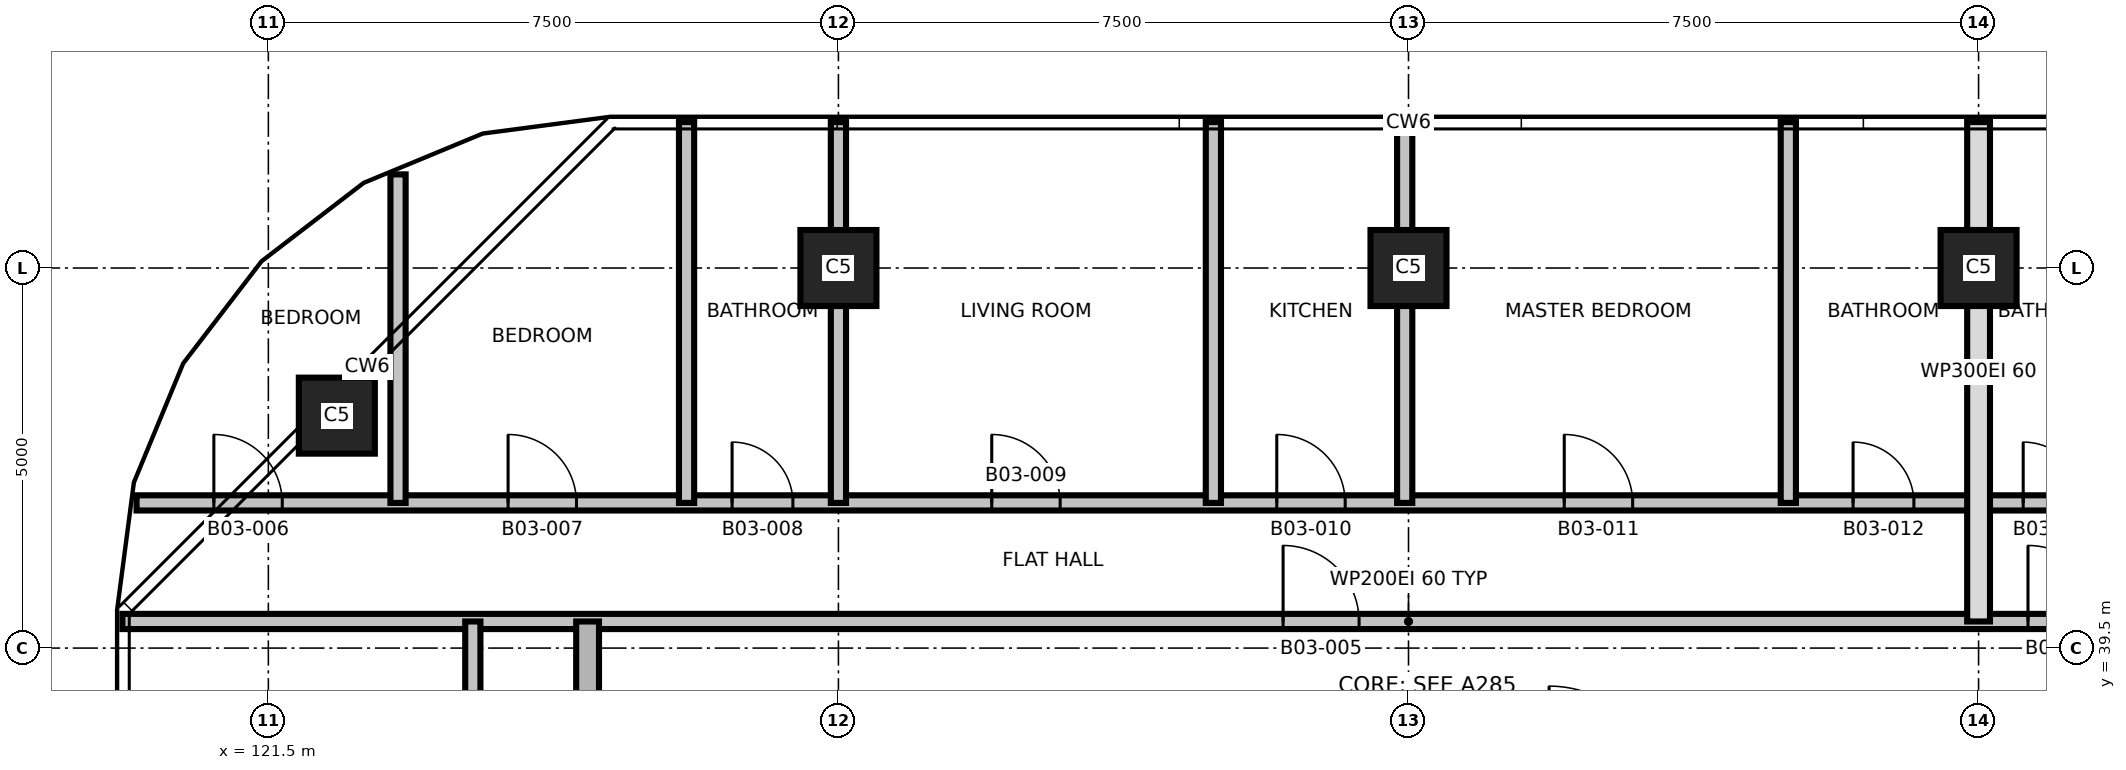
"""IFC4 building model, lengths in metres.
Left out: names, types, materials, properties, quantities, classifications, styles, units other than length and angle.
Written with IfcOpenShell. Run it as: python <this file> out.ifc"""

import sys

from ifc_helpers import new_model, si_unit, direction, frame, frame_2d, origin, origin_2d, place, context, subcontext, project, spatial, rectangle, extrude, element, fill, save


model = new_model("IFC4")
c1 = context("Model", 3, precision=1e-05, world=origin(), true_north=direction((0.0, 1.0)))
c2 = subcontext(c1, "Body", "Model", "MODEL_VIEW")
j1 = project(units=[si_unit("LENGTHUNIT", "METRE"), si_unit("PLANEANGLEUNIT", "RADIAN")], contexts=[c1])
p1 = place(None, origin())
s1 = spatial("IfcSite", under=j1, at=p1, CompositionType="ELEMENT")
p2 = place(p1, origin())
s2 = spatial("IfcBuilding", under=s1, at=p2, CompositionType="ELEMENT")
p3 = place(p2, frame((0.0, 0.0, 52.0)))
s3 = spatial("IfcBuildingStorey", under=s2, at=p3, CompositionType="ELEMENT", Elevation=52.0)
for number, where, z_axis, x_axis in (
    (1, (122.401, 42.558, 0.0), (0.0, 0.0, 1.0), (1.0, 0.0, 0.0)),
    (2, (129.0, 44.5, 0.0), (0.0, 0.0, 1.0), (1.0, 0.0, 0.0)),
    (3, (136.5, 44.5, 0.0), (0.0, 0.0, 1.0), (1.0, 0.0, 0.0)),
    (4, (144.0, 44.5, 0.0), (0.0, 0.0, 1.0), (1.0, 0.0, 0.0)),
):
    element("IfcColumn", number, at=place(p3, frame(where, z_axis=z_axis, x_axis=x_axis)), inside=s3, PredefinedType="COLUMN", context=c2, shape_type="SweptSolid", body=[
        extrude(rectangle(XDim=1.0, YDim=1.0, at=origin_2d()), origin(), (0.0, 0.0, 1.0), 3.7),
    ])
p4 = place(p3, frame((119.58, 39.85, 0.0), z_axis=(0.0, 0.0, 1.0), x_axis=(1.0, 0.0, 0.0)))
e5 = element("IfcWall", 5, at=p4, inside=s3, PredefinedType="PARTITIONING", context=c2, shape_type="SweptSolid", body=[
    extrude(rectangle(XDim=33.84, YDim=0.2, at=frame_2d((16.92, 0.0))), origin(), (0.0, 0.0, 1.0), 3.4),
])
p5 = place(p4, frame((15.27, 0.0, 0.0)))
e6 = element("IfcOpeningElement", 6, at=p5, cuts=e5, PredefinedType="OPENING", context=c2, shape_type="SweptSolid", body=[
    extrude(rectangle(XDim=1.0, YDim=2.1, at=frame_2d((0.5, 1.05))), frame((0.0, 0.11, 0.0), z_axis=(0.0, -1.0, 0.0), x_axis=(1.0, 0.0, 0.0)), (0.0, 0.0, 1.0), 0.22),
])
p6 = place(p4, frame((25.07, 0.0, 0.0)))
e7 = element("IfcOpeningElement", 7, at=p6, cuts=e5, PredefinedType="OPENING", context=c2, shape_type="SweptSolid", body=[
    extrude(rectangle(XDim=1.0, YDim=2.1, at=frame_2d((0.5, 1.05))), frame((0.0, 0.11, 0.0), z_axis=(0.0, -1.0, 0.0), x_axis=(1.0, 0.0, 0.0)), (0.0, 0.0, 1.0), 0.22),
])
p7 = place(p3, frame((119.766, 41.41, 0.0), z_axis=(0.0, 0.0, 1.0), x_axis=(1.0, 0.0, 0.0)))
e8 = element("IfcWall", 8, at=p7, inside=s3, PredefinedType="PARTITIONING", context=c2, shape_type="SweptSolid", body=[
    extrude(rectangle(XDim=33.468, YDim=0.2, at=frame_2d((16.734, 0.0))), origin(), (0.0, 0.0, 1.0), 3.4),
])
p8 = place(p7, frame((1.017, 0.0, 0.0)))
e9 = element("IfcOpeningElement", 9, at=p8, cuts=e8, PredefinedType="OPENING", context=c2, shape_type="SweptSolid", body=[
    extrude(rectangle(XDim=0.9, YDim=2.1, at=frame_2d((0.45, 1.05))), frame((0.0, 0.11, 0.0), z_axis=(0.0, -1.0, 0.0), x_axis=(1.0, 0.0, 0.0)), (0.0, 0.0, 1.0), 0.22),
])
p9 = place(p7, frame((4.888, 0.0, 0.0)))
e10 = element("IfcOpeningElement", 10, at=p9, cuts=e8, PredefinedType="OPENING", context=c2, shape_type="SweptSolid", body=[
    extrude(rectangle(XDim=0.9, YDim=2.1, at=frame_2d((0.45, 1.05))), frame((0.0, 0.11, 0.0), z_axis=(0.0, -1.0, 0.0), x_axis=(1.0, 0.0, 0.0)), (0.0, 0.0, 1.0), 0.22),
])
p10 = place(p7, frame((7.835, 0.0, 0.0)))
e11 = element("IfcOpeningElement", 11, at=p10, cuts=e8, PredefinedType="OPENING", context=c2, shape_type="SweptSolid", body=[
    extrude(rectangle(XDim=0.8, YDim=2.1, at=frame_2d((0.4, 1.05))), frame((0.0, 0.11, 0.0), z_axis=(0.0, -1.0, 0.0), x_axis=(1.0, 0.0, 0.0)), (0.0, 0.0, 1.0), 0.22),
])
p11 = place(p7, frame((11.251, 0.0, 0.0)))
e12 = element("IfcOpeningElement", 12, at=p11, cuts=e8, PredefinedType="OPENING", context=c2, shape_type="SweptSolid", body=[
    extrude(rectangle(XDim=0.9, YDim=2.1, at=frame_2d((0.45, 1.05))), frame((0.0, 0.11, 0.0), z_axis=(0.0, -1.0, 0.0), x_axis=(1.0, 0.0, 0.0)), (0.0, 0.0, 1.0), 0.22),
])
p12 = place(p7, frame((15.001, 0.0, 0.0)))
e13 = element("IfcOpeningElement", 13, at=p12, cuts=e8, PredefinedType="OPENING", context=c2, shape_type="SweptSolid", body=[
    extrude(rectangle(XDim=0.9, YDim=2.1, at=frame_2d((0.45, 1.05))), frame((0.0, 0.11, 0.0), z_axis=(0.0, -1.0, 0.0), x_axis=(1.0, 0.0, 0.0)), (0.0, 0.0, 1.0), 0.22),
])
p13 = place(p7, frame((18.783, 0.0, 0.0)))
e14 = element("IfcOpeningElement", 14, at=p13, cuts=e8, PredefinedType="OPENING", context=c2, shape_type="SweptSolid", body=[
    extrude(rectangle(XDim=0.9, YDim=2.1, at=frame_2d((0.45, 1.05))), frame((0.0, 0.11, 0.0), z_axis=(0.0, -1.0, 0.0), x_axis=(1.0, 0.0, 0.0)), (0.0, 0.0, 1.0), 0.22),
])
p14 = place(p7, frame((22.583, 0.0, 0.0)))
e15 = element("IfcOpeningElement", 15, at=p14, cuts=e8, PredefinedType="OPENING", context=c2, shape_type="SweptSolid", body=[
    extrude(rectangle(XDim=0.8, YDim=2.1, at=frame_2d((0.4, 1.05))), frame((0.0, 0.11, 0.0), z_axis=(0.0, -1.0, 0.0), x_axis=(1.0, 0.0, 0.0)), (0.0, 0.0, 1.0), 0.22),
])
p15 = place(p7, frame((24.821, 0.0, 0.0)))
e16 = element("IfcOpeningElement", 16, at=p15, cuts=e8, PredefinedType="OPENING", context=c2, shape_type="SweptSolid", body=[
    extrude(rectangle(XDim=0.8, YDim=2.1, at=frame_2d((0.4, 1.05))), frame((0.0, 0.11, 0.0), z_axis=(0.0, -1.0, 0.0), x_axis=(1.0, 0.0, 0.0)), (0.0, 0.0, 1.0), 0.22),
])
p16 = place(p7, frame((26.923, 0.0, 0.0)))
e17 = element("IfcOpeningElement", 17, at=p16, cuts=e8, PredefinedType="OPENING", context=c2, shape_type="SweptSolid", body=[
    extrude(rectangle(XDim=0.9, YDim=2.1, at=frame_2d((0.45, 1.05))), frame((0.0, 0.11, 0.0), z_axis=(0.0, -1.0, 0.0), x_axis=(1.0, 0.0, 0.0)), (0.0, 0.0, 1.0), 0.22),
])
p17 = place(p7, frame((31.556, 0.0, 0.0)))
e18 = element("IfcOpeningElement", 18, at=p17, cuts=e8, PredefinedType="OPENING", context=c2, shape_type="SweptSolid", body=[
    extrude(rectangle(XDim=0.9, YDim=2.1, at=frame_2d((0.45, 1.05))), frame((0.0, 0.11, 0.0), z_axis=(0.0, -1.0, 0.0), x_axis=(1.0, 0.0, 0.0)), (0.0, 0.0, 1.0), 0.22),
])
p18 = place(p3, frame((123.206, 41.41, 0.0), z_axis=(0.0, 0.0, 1.0), x_axis=(0.0, 1.0, 0.0)))
e19 = element("IfcWall", 19, at=p18, inside=s3, PredefinedType="PARTITIONING", context=c2, shape_type="SweptSolid", body=[
    extrude(rectangle(XDim=4.322, YDim=0.2, at=frame_2d((2.161, 0.0))), origin(), (0.0, 0.0, 1.0), 3.4),
])
p19 = place(p3, frame((124.19, 22.15, 0.0), z_axis=(0.0, 0.0, 1.0), x_axis=(0.0, 1.0, 0.0)))
e20 = element("IfcWall", 20, at=p19, inside=s3, PredefinedType="PARTITIONING", context=c2, shape_type="SweptSolid", body=[
    extrude(rectangle(XDim=17.7, YDim=0.2, at=frame_2d((8.85, 0.0))), origin(), (0.0, 0.0, 1.0), 3.4),
])
p20 = place(p19, frame((1.028, 0.0, 0.0)))
e21 = element("IfcOpeningElement", 21, at=p20, cuts=e20, PredefinedType="OPENING", context=c2, shape_type="SweptSolid", body=[
    extrude(rectangle(XDim=0.9, YDim=2.1, at=frame_2d((0.45, 1.05))), frame((0.0, 0.11, 0.0), z_axis=(0.0, -1.0, 0.0), x_axis=(1.0, 0.0, 0.0)), (0.0, 0.0, 1.0), 0.22),
])
p21 = place(p19, frame((3.253, 0.0, 0.0)))
e22 = element("IfcOpeningElement", 22, at=p21, cuts=e20, PredefinedType="OPENING", context=c2, shape_type="SweptSolid", body=[
    extrude(rectangle(XDim=0.8, YDim=2.1, at=frame_2d((0.4, 1.05))), frame((0.0, 0.11, 0.0), z_axis=(0.0, -1.0, 0.0), x_axis=(1.0, 0.0, 0.0)), (0.0, 0.0, 1.0), 0.22),
])
p22 = place(p19, frame((6.867, 0.0, 0.0)))
e23 = element("IfcOpeningElement", 23, at=p22, cuts=e20, PredefinedType="OPENING", context=c2, shape_type="SweptSolid", body=[
    extrude(rectangle(XDim=0.9, YDim=2.1, at=frame_2d((0.45, 1.05))), frame((0.0, 0.11, 0.0), z_axis=(0.0, -1.0, 0.0), x_axis=(1.0, 0.0, 0.0)), (0.0, 0.0, 1.0), 0.22),
])
p23 = place(p19, frame((11.367, 0.0, 0.0)))
e24 = element("IfcOpeningElement", 24, at=p23, cuts=e20, PredefinedType="OPENING", context=c2, shape_type="SweptSolid", body=[
    extrude(rectangle(XDim=0.9, YDim=2.1, at=frame_2d((0.45, 1.05))), frame((0.0, 0.11, 0.0), z_axis=(0.0, -1.0, 0.0), x_axis=(1.0, 0.0, 0.0)), (0.0, 0.0, 1.0), 0.22),
])
p24 = place(p19, frame((15.075, 0.0, 0.0)))
e25 = element("IfcOpeningElement", 25, at=p24, cuts=e20, PredefinedType="OPENING", context=c2, shape_type="SweptSolid", body=[
    extrude(rectangle(XDim=0.9, YDim=2.1, at=frame_2d((0.45, 1.05))), frame((0.0, 0.11, 0.0), z_axis=(0.0, -1.0, 0.0), x_axis=(1.0, 0.0, 0.0)), (0.0, 0.0, 1.0), 0.22),
])
p25 = place(p3, frame((125.7, 22.15, 0.0), z_axis=(0.0, 0.0, 1.0), x_axis=(0.0, 1.0, 0.0)))
e26 = element("IfcWall", 26, at=p25, inside=s3, PredefinedType="SHEAR", context=c2, shape_type="SweptSolid", body=[
    extrude(rectangle(XDim=17.7, YDim=0.3, at=frame_2d((8.85, 0.0))), origin(), (0.0, 0.0, 1.0), 3.4),
])
p26 = place(p25, frame((2.7, 0.0, 0.0)))
e27 = element("IfcOpeningElement", 27, at=p26, cuts=e26, PredefinedType="OPENING", context=c2, shape_type="SweptSolid", body=[
    extrude(rectangle(XDim=1.0, YDim=2.1, at=frame_2d((0.5, 1.05))), frame((0.0, 0.16, 0.0), z_axis=(0.0, -1.0, 0.0), x_axis=(1.0, 0.0, 0.0)), (0.0, 0.0, 1.0), 0.32),
])
for number, where, z_axis, x_axis in (
    (28, (127.002, 41.41, 0.0), (0.0, 0.0, 1.0), (0.0, 1.0, 0.0)),
    (29, (129.0, 41.41, 0.0), (0.0, 0.0, 1.0), (0.0, 1.0, 0.0)),
    (30, (133.933, 41.41, 0.0), (0.0, 0.0, 1.0), (0.0, 1.0, 0.0)),
    (31, (136.45, 41.41, 0.0), (0.0, 0.0, 1.0), (0.0, 1.0, 0.0)),
    (32, (141.497, 41.41, 0.0), (0.0, 0.0, 1.0), (0.0, 1.0, 0.0)),
):
    element("IfcWall", number, at=place(p3, frame(where, z_axis=z_axis, x_axis=x_axis)), inside=s3, PredefinedType="PARTITIONING", context=c2, shape_type="SweptSolid", body=[
        extrude(rectangle(XDim=5.01, YDim=0.2, at=frame_2d((2.505, 0.0))), origin(), (0.0, 0.0, 1.0), 3.4),
    ])
p27 = place(p3, frame((144.0, 39.85, 0.0), z_axis=(0.0, 0.0, 1.0), x_axis=(0.0, 1.0, 0.0)))
e33 = element("IfcWall", 33, at=p27, inside=s3, PredefinedType="PARTITIONING", context=c2, shape_type="SweptSolid", body=[
    extrude(rectangle(XDim=6.57, YDim=0.3, at=frame_2d((3.285, 0.0))), origin(), (0.0, 0.0, 1.0), 3.4),
])
p28 = place(p5, origin())
e34 = element("IfcDoor", 34, at=p28, inside=s3, OperationType="SINGLE_SWING_LEFT", PredefinedType="DOOR", context=c2, shape_type="SweptSolid", body=[
    extrude(rectangle(XDim=1.0, YDim=2.1, at=frame_2d((0.5, 1.05))), frame((0.0, 0.025, 0.0), z_axis=(0.0, -1.0, 0.0), x_axis=(1.0, 0.0, 0.0)), (0.0, 0.0, 1.0), 0.05),
])
fill(e6, e34)
p29 = place(p8, origin())
e35 = element("IfcDoor", 35, at=p29, inside=s3, OperationType="SINGLE_SWING_RIGHT", PredefinedType="DOOR", context=c2, shape_type="SweptSolid", body=[
    extrude(rectangle(XDim=0.9, YDim=2.1, at=frame_2d((0.45, 1.05))), frame((0.0, 0.025, 0.0), z_axis=(0.0, -1.0, 0.0), x_axis=(1.0, 0.0, 0.0)), (0.0, 0.0, 1.0), 0.05),
])
fill(e9, e35)
p30 = place(p9, origin())
e36 = element("IfcDoor", 36, at=p30, inside=s3, OperationType="SINGLE_SWING_LEFT", PredefinedType="DOOR", context=c2, shape_type="SweptSolid", body=[
    extrude(rectangle(XDim=0.9, YDim=2.1, at=frame_2d((0.45, 1.05))), frame((0.0, 0.025, 0.0), z_axis=(0.0, -1.0, 0.0), x_axis=(1.0, 0.0, 0.0)), (0.0, 0.0, 1.0), 0.05),
])
fill(e10, e36)
p31 = place(p10, origin())
e37 = element("IfcDoor", 37, at=p31, inside=s3, OperationType="SINGLE_SWING_RIGHT", PredefinedType="DOOR", context=c2, shape_type="SweptSolid", body=[
    extrude(rectangle(XDim=0.8, YDim=2.1, at=frame_2d((0.4, 1.05))), frame((0.0, 0.025, 0.0), z_axis=(0.0, -1.0, 0.0), x_axis=(1.0, 0.0, 0.0)), (0.0, 0.0, 1.0), 0.05),
])
fill(e11, e37)
p32 = place(p11, origin())
e38 = element("IfcDoor", 38, at=p32, inside=s3, OperationType="SINGLE_SWING_LEFT", PredefinedType="DOOR", context=c2, shape_type="SweptSolid", body=[
    extrude(rectangle(XDim=0.9, YDim=2.1, at=frame_2d((0.45, 1.05))), frame((0.0, 0.025, 0.0), z_axis=(0.0, -1.0, 0.0), x_axis=(1.0, 0.0, 0.0)), (0.0, 0.0, 1.0), 0.05),
])
fill(e12, e38)
p33 = place(p12, origin())
e39 = element("IfcDoor", 39, at=p33, inside=s3, OperationType="SINGLE_SWING_RIGHT", PredefinedType="DOOR", context=c2, shape_type="SweptSolid", body=[
    extrude(rectangle(XDim=0.9, YDim=2.1, at=frame_2d((0.45, 1.05))), frame((0.0, 0.025, 0.0), z_axis=(0.0, -1.0, 0.0), x_axis=(1.0, 0.0, 0.0)), (0.0, 0.0, 1.0), 0.05),
])
fill(e13, e39)
p34 = place(p13, origin())
e40 = element("IfcDoor", 40, at=p34, inside=s3, OperationType="SINGLE_SWING_LEFT", PredefinedType="DOOR", context=c2, shape_type="SweptSolid", body=[
    extrude(rectangle(XDim=0.9, YDim=2.1, at=frame_2d((0.45, 1.05))), frame((0.0, 0.025, 0.0), z_axis=(0.0, -1.0, 0.0), x_axis=(1.0, 0.0, 0.0)), (0.0, 0.0, 1.0), 0.05),
])
fill(e14, e40)
p35 = place(p14, origin())
e41 = element("IfcDoor", 41, at=p35, inside=s3, OperationType="SINGLE_SWING_RIGHT", PredefinedType="DOOR", context=c2, shape_type="SweptSolid", body=[
    extrude(rectangle(XDim=0.8, YDim=2.1, at=frame_2d((0.4, 1.05))), frame((0.0, 0.025, 0.0), z_axis=(0.0, -1.0, 0.0), x_axis=(1.0, 0.0, 0.0)), (0.0, 0.0, 1.0), 0.05),
])
fill(e15, e41)
p36 = place(p6, origin())
e42 = element("IfcDoor", 42, at=p36, inside=s3, OperationType="SINGLE_SWING_LEFT", PredefinedType="DOOR", context=c2, shape_type="SweptSolid", body=[
    extrude(rectangle(XDim=1.0, YDim=2.1, at=frame_2d((0.5, 1.05))), frame((0.0, 0.025, 0.0), z_axis=(0.0, -1.0, 0.0), x_axis=(1.0, 0.0, 0.0)), (0.0, 0.0, 1.0), 0.05),
])
fill(e7, e42)
p37 = place(p15, origin())
e43 = element("IfcDoor", 43, at=p37, inside=s3, OperationType="SINGLE_SWING_RIGHT", PredefinedType="DOOR", context=c2, shape_type="SweptSolid", body=[
    extrude(rectangle(XDim=0.8, YDim=2.1, at=frame_2d((0.4, 1.05))), frame((0.0, 0.025, 0.0), z_axis=(0.0, -1.0, 0.0), x_axis=(1.0, 0.0, 0.0)), (0.0, 0.0, 1.0), 0.05),
])
fill(e16, e43)
save(model, sys.argv[1])
